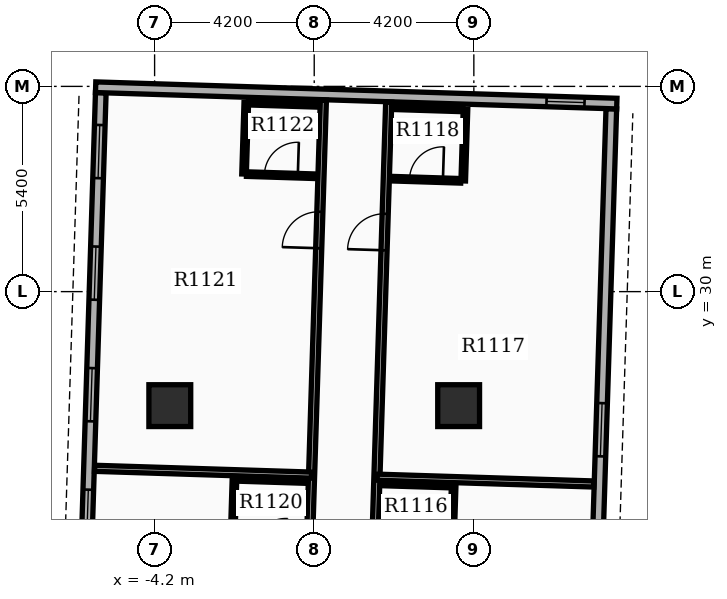
"""IFC4 building model, lengths in metres.
Left out: names, types, materials, properties, quantities, classifications, styles, units other than length and angle.
Written with IfcOpenShell. Run it as: python <this file> out.ifc"""

import sys

from ifc_helpers import new_model, si_unit, direction, frame, frame_2d, origin, origin_2d, place, context, subcontext, project, spatial, rectangle, extrude, element, fill, save


model = new_model("IFC4")
c1 = context("Model", 3, precision=1e-05, world=origin(), true_north=direction((0.0, 1.0)))
c2 = subcontext(c1, "Body", "Model", "MODEL_VIEW")
j1 = project(units=[si_unit("LENGTHUNIT", "METRE"), si_unit("PLANEANGLEUNIT", "RADIAN")], contexts=[c1])
p1 = place(None, origin())
s1 = spatial("IfcSite", under=j1, at=p1, CompositionType="ELEMENT")
p2 = place(p1, origin())
s2 = spatial("IfcBuilding", under=s1, at=p2, CompositionType="ELEMENT")
p3 = place(p2, frame((0.0, 0.0, 71.7)))
s3 = spatial("IfcBuildingStorey", under=s2, at=p3, CompositionType="ELEMENT", Elevation=71.7)
for number, where, z_axis, x_axis in (
    (1, (-3.8, 27.0, 0.0), (0.0, 0.0, 1.0), (1.0, 0.0, 0.0)),
    (2, (3.8, 27.0, 0.0), (0.0, 0.0, 1.0), (1.0, 0.0, 0.0)),
):
    element("IfcColumn", number, at=place(p3, frame(where, z_axis=z_axis, x_axis=x_axis)), inside=s3, PredefinedType="COLUMN", context=c2, shape_type="SweptSolid", body=[
        extrude(rectangle(XDim=1.1, YDim=1.1, at=origin_2d()), origin(), (0.0, 0.0, 1.0), 3.9),
    ])
p4 = place(p3, frame((7.186, 14.721, 0.0), z_axis=(0.0, 0.0, 1.0), x_axis=(0.031410322165, 0.999506574096, 0.0)))
e3 = element("IfcWall", 3, at=p4, inside=s3, PredefinedType="STANDARD", context=c2, shape_type="SweptSolid", body=[
    extrude(rectangle(XDim=20.1, YDim=0.28, at=frame_2d((10.05, 0.0))), origin(), (0.0, 0.0, 1.0), 2.91),
])
p5 = place(p4, frame((0.85, 0.0, 0.8)))
e4 = element("IfcOpeningElement", 4, at=p5, cuts=e3, PredefinedType="OPENING", context=c2, shape_type="SweptSolid", body=[
    extrude(rectangle(XDim=1.4, YDim=1.6, at=frame_2d((0.7, 0.8))), frame((0.0, 0.15, 0.0), z_axis=(0.0, -1.0, 0.0), x_axis=(1.0, 0.0, 0.0)), (0.0, 0.0, 1.0), 0.3),
])
p6 = place(p4, frame((4.05, 0.0, 0.8)))
e5 = element("IfcOpeningElement", 5, at=p6, cuts=e3, PredefinedType="OPENING", context=c2, shape_type="SweptSolid", body=[
    extrude(rectangle(XDim=1.4, YDim=1.6, at=frame_2d((0.7, 0.8))), frame((0.0, 0.15, 0.0), z_axis=(0.0, -1.0, 0.0), x_axis=(1.0, 0.0, 0.0)), (0.0, 0.0, 1.0), 0.3),
])
p7 = place(p4, frame((7.25, 0.0, 0.8)))
e6 = element("IfcOpeningElement", 6, at=p7, cuts=e3, PredefinedType="OPENING", context=c2, shape_type="SweptSolid", body=[
    extrude(rectangle(XDim=1.4, YDim=1.6, at=frame_2d((0.7, 0.8))), frame((0.0, 0.15, 0.0), z_axis=(0.0, -1.0, 0.0), x_axis=(1.0, 0.0, 0.0)), (0.0, 0.0, 1.0), 0.3),
])
p8 = place(p4, frame((10.95, 0.0, 0.8)))
e7 = element("IfcOpeningElement", 7, at=p8, cuts=e3, PredefinedType="OPENING", context=c2, shape_type="SweptSolid", body=[
    extrude(rectangle(XDim=1.4, YDim=1.6, at=frame_2d((0.7, 0.8))), frame((0.0, 0.15, 0.0), z_axis=(0.0, -1.0, 0.0), x_axis=(1.0, 0.0, 0.0)), (0.0, 0.0, 1.0), 0.3),
])
p9 = place(p3, frame((-5.616, 35.234, 0.0), z_axis=(0.0, 0.0, 1.0), x_axis=(-0.031398187845, -0.999506955354, 0.0)))
e8 = element("IfcWall", 8, at=p9, inside=s3, PredefinedType="STANDARD", context=c2, shape_type="SweptSolid", body=[
    extrude(rectangle(XDim=20.1, YDim=0.28, at=frame_2d((10.05, 0.0))), origin(), (0.0, 0.0, 1.0), 2.91),
])
p10 = place(p9, frame((0.85, 0.0, 0.8)))
e9 = element("IfcOpeningElement", 9, at=p10, cuts=e8, PredefinedType="OPENING", context=c2, shape_type="SweptSolid", body=[
    extrude(rectangle(XDim=1.4, YDim=1.6, at=frame_2d((0.7, 0.8))), frame((0.0, 0.15, 0.0), z_axis=(0.0, -1.0, 0.0), x_axis=(1.0, 0.0, 0.0)), (0.0, 0.0, 1.0), 0.3),
])
p11 = place(p9, frame((4.05, 0.0, 0.8)))
e10 = element("IfcOpeningElement", 10, at=p11, cuts=e8, PredefinedType="OPENING", context=c2, shape_type="SweptSolid", body=[
    extrude(rectangle(XDim=1.4, YDim=1.6, at=frame_2d((0.7, 0.8))), frame((0.0, 0.15, 0.0), z_axis=(0.0, -1.0, 0.0), x_axis=(1.0, 0.0, 0.0)), (0.0, 0.0, 1.0), 0.3),
])
p12 = place(p9, frame((7.25, 0.0, 0.8)))
e11 = element("IfcOpeningElement", 11, at=p12, cuts=e8, PredefinedType="OPENING", context=c2, shape_type="SweptSolid", body=[
    extrude(rectangle(XDim=1.4, YDim=1.6, at=frame_2d((0.7, 0.8))), frame((0.0, 0.15, 0.0), z_axis=(0.0, -1.0, 0.0), x_axis=(1.0, 0.0, 0.0)), (0.0, 0.0, 1.0), 0.3),
])
p13 = place(p9, frame((10.45, 0.0, 0.8)))
e12 = element("IfcOpeningElement", 12, at=p13, cuts=e8, PredefinedType="OPENING", context=c2, shape_type="SweptSolid", body=[
    extrude(rectangle(XDim=1.4, YDim=1.6, at=frame_2d((0.7, 0.8))), frame((0.0, 0.15, 0.0), z_axis=(0.0, -1.0, 0.0), x_axis=(1.0, 0.0, 0.0)), (0.0, 0.0, 1.0), 0.3),
])
p14 = place(p3, frame((7.962, 34.947, 0.0), z_axis=(0.0, 0.0, 1.0), x_axis=(-0.999506679556, 0.031406966164, 0.0)))
e13 = element("IfcWall", 13, at=p14, inside=s3, PredefinedType="STANDARD", context=c2, shape_type="SweptSolid", body=[
    extrude(rectangle(XDim=13.72, YDim=0.28, at=frame_2d((6.86, 0.0))), origin(), (0.0, 0.0, 1.0), 2.91),
])
p15 = place(p14, frame((0.85, 0.0, 0.85)))
e14 = element("IfcOpeningElement", 14, at=p15, cuts=e13, PredefinedType="OPENING", context=c2, shape_type="SweptSolid", body=[
    extrude(rectangle(XDim=1.0, YDim=1.5, at=frame_2d((0.5, 0.75))), frame((0.0, 0.15, 0.0), z_axis=(0.0, -1.0, 0.0), x_axis=(1.0, 0.0, 0.0)), (0.0, 0.0, 1.0), 0.3),
])
p16 = place(p3, frame((1.326, 14.816, 0.0), z_axis=(0.0, 0.0, 1.0), x_axis=(0.031415650687, 0.999506406629, 0.0)))
e15 = element("IfcWall", 15, at=p16, inside=s3, PredefinedType="PARTITIONING", context=c2, shape_type="SweptSolid", body=[
    extrude(rectangle(XDim=20.182, YDim=0.16, at=frame_2d((10.091, 0.0))), origin(), (0.0, 0.0, 1.0), 2.9),
])
p17 = place(p16, frame((1.106, 0.0, 0.0)))
e16 = element("IfcOpeningElement", 16, at=p17, cuts=e15, PredefinedType="OPENING", context=c2, shape_type="SweptSolid", body=[
    extrude(rectangle(XDim=0.96, YDim=2.15, at=frame_2d((0.48, 1.075))), frame((0.0, 0.09, 0.0), z_axis=(0.0, -1.0, 0.0), x_axis=(1.0, 0.0, 0.0)), (0.0, 0.0, 1.0), 0.18),
])
p18 = place(p16, frame((16.28, 0.0, 0.0)))
e17 = element("IfcOpeningElement", 17, at=p18, cuts=e15, PredefinedType="OPENING", context=c2, shape_type="SweptSolid", body=[
    extrude(rectangle(XDim=0.96, YDim=2.15, at=frame_2d((0.48, 1.075))), frame((0.0, 0.09, 0.0), z_axis=(0.0, -1.0, 0.0), x_axis=(1.0, 0.0, 0.0)), (0.0, 0.0, 1.0), 0.18),
])
p19 = place(p3, frame((1.65, 25.118, 0.0), z_axis=(0.0, 0.0, 1.0), x_axis=(0.999505045245, -0.031458934028, 0.0)))
e18 = element("IfcWall", 18, at=p19, inside=s3, PredefinedType="PARTITIONING", context=c2, shape_type="SweptSolid", body=[
    extrude(rectangle(XDim=5.712, YDim=0.16, at=frame_2d((2.856, 0.0))), origin(), (0.0, 0.0, 1.0), 2.9),
])
p20 = place(p3, frame((1.785, 24.953, 0.0), z_axis=(0.0, 0.0, 1.0), x_axis=(0.999503004171, -0.03152371574, 0.0)))
e19 = element("IfcWall", 19, at=p20, inside=s3, PredefinedType="PARTITIONING", context=c2, shape_type="SweptSolid", body=[
    extrude(rectangle(XDim=1.82, YDim=0.12, at=frame_2d((0.91, 0.0))), origin(), (0.0, 0.0, 1.0), 2.9),
])
p21 = place(p3, frame((3.61, 23.015, 0.0), z_axis=(0.0, 0.0, 1.0), x_axis=(0.031425292588, 0.999506103526, 0.0)))
e20 = element("IfcWall", 20, at=p21, inside=s3, PredefinedType="PARTITIONING", context=c2, shape_type="SweptSolid", body=[
    extrude(rectangle(XDim=1.88, YDim=0.12, at=frame_2d((0.94, 0.0))), origin(), (0.0, 0.0, 1.0), 2.9),
])
p22 = place(p3, frame((2.037, 32.972, 0.0), z_axis=(0.0, 0.0, 1.0), x_axis=(0.999503004171, -0.03152371574, 0.0)))
e21 = element("IfcWall", 21, at=p22, inside=s3, PredefinedType="PARTITIONING", context=c2, shape_type="SweptSolid", body=[
    extrude(rectangle(XDim=1.82, YDim=0.12, at=frame_2d((0.91, 0.0))), origin(), (0.0, 0.0, 1.0), 2.9),
])
p23 = place(p22, frame((0.47, 0.0, 0.0)))
e22 = element("IfcOpeningElement", 22, at=p23, cuts=e21, PredefinedType="OPENING", context=c2, shape_type="SweptSolid", body=[
    extrude(rectangle(XDim=0.88, YDim=2.1, at=frame_2d((0.44, 1.05))), frame((0.0, 0.07, 0.0), z_axis=(0.0, -1.0, 0.0), x_axis=(1.0, 0.0, 0.0)), (0.0, 0.0, 1.0), 0.14),
])
p24 = place(p3, frame((2.096, 34.851, 0.0), z_axis=(0.0, 0.0, 1.0), x_axis=(0.999507221803, -0.031389704724, 0.0)))
e23 = element("IfcWall", 23, at=p24, inside=s3, PredefinedType="PARTITIONING", context=c2, shape_type="SweptSolid", body=[
    extrude(rectangle(XDim=1.82, YDim=0.12, at=frame_2d((0.91, 0.0))), origin(), (0.0, 0.0, 1.0), 2.9),
])
p25 = place(p3, frame((3.921, 32.913, 0.0), z_axis=(0.0, 0.0, 1.0), x_axis=(0.031295563454, 0.999510173889, 0.0)))
e24 = element("IfcWall", 24, at=p25, inside=s3, PredefinedType="PARTITIONING", context=c2, shape_type="SweptSolid", body=[
    extrude(rectangle(XDim=1.88, YDim=0.12, at=frame_2d((0.94, 0.0))), origin(), (0.0, 0.0, 1.0), 2.9),
])
p26 = place(p3, frame((-0.393, 14.87, 0.0), z_axis=(0.0, 0.0, 1.0), x_axis=(0.031403565719, 0.9995067864, 0.0)))
e25 = element("IfcWall", 25, at=p26, inside=s3, PredefinedType="PARTITIONING", context=c2, shape_type="SweptSolid", body=[
    extrude(rectangle(XDim=20.182, YDim=0.16, at=frame_2d((10.091, 0.0))), origin(), (0.0, 0.0, 1.0), 2.9),
])
p27 = place(p26, frame((1.106, 0.0, 0.0)))
e26 = element("IfcOpeningElement", 26, at=p27, cuts=e25, PredefinedType="OPENING", context=c2, shape_type="SweptSolid", body=[
    extrude(rectangle(XDim=0.96, YDim=2.15, at=frame_2d((0.48, 1.075))), frame((0.0, 0.09, 0.0), z_axis=(0.0, -1.0, 0.0), x_axis=(1.0, 0.0, 0.0)), (0.0, 0.0, 1.0), 0.18),
])
p28 = place(p26, frame((16.28, 0.0, 0.0)))
e27 = element("IfcOpeningElement", 27, at=p28, cuts=e25, PredefinedType="OPENING", context=c2, shape_type="SweptSolid", body=[
    extrude(rectangle(XDim=0.96, YDim=2.15, at=frame_2d((0.48, 1.075))), frame((0.0, 0.09, 0.0), z_axis=(0.0, -1.0, 0.0), x_axis=(1.0, 0.0, 0.0)), (0.0, 0.0, 1.0), 0.18),
])
p29 = place(p3, frame((-0.069, 25.172, 0.0), z_axis=(0.0, 0.0, 1.0), x_axis=(-0.999506430506, 0.031414891017, 0.0)))
e28 = element("IfcWall", 28, at=p29, inside=s3, PredefinedType="PARTITIONING", context=c2, shape_type="SweptSolid", body=[
    extrude(rectangle(XDim=5.712, YDim=0.16, at=frame_2d((2.856, 0.0))), origin(), (0.0, 0.0, 1.0), 2.9),
])
p30 = place(p3, frame((-2.033, 25.073, 0.0), z_axis=(0.0, 0.0, 1.0), x_axis=(0.999507221803, -0.031389704724, 0.0)))
e29 = element("IfcWall", 29, at=p30, inside=s3, PredefinedType="PARTITIONING", context=c2, shape_type="SweptSolid", body=[
    extrude(rectangle(XDim=1.82, YDim=0.12, at=frame_2d((0.91, 0.0))), origin(), (0.0, 0.0, 1.0), 2.9),
])
p31 = place(p3, frame((-2.157, 23.196, 0.0), z_axis=(0.0, 0.0, 1.0), x_axis=(0.031429371883, 0.999505975261, 0.0)))
e30 = element("IfcWall", 30, at=p31, inside=s3, PredefinedType="PARTITIONING", context=c2, shape_type="SweptSolid", body=[
    extrude(rectangle(XDim=1.88, YDim=0.12, at=frame_2d((0.94, 0.0))), origin(), (0.0, 0.0, 1.0), 2.9),
])
p32 = place(p3, frame((-1.781, 33.092, 0.0), z_axis=(0.0, 0.0, 1.0), x_axis=(0.999507221803, -0.031389704724, 0.0)))
e31 = element("IfcWall", 31, at=p32, inside=s3, PredefinedType="PARTITIONING", context=c2, shape_type="SweptSolid", body=[
    extrude(rectangle(XDim=1.82, YDim=0.12, at=frame_2d((0.91, 0.0))), origin(), (0.0, 0.0, 1.0), 2.9),
])
p33 = place(p32, frame((0.47, 0.0, 0.0)))
e32 = element("IfcOpeningElement", 32, at=p33, cuts=e31, PredefinedType="OPENING", context=c2, shape_type="SweptSolid", body=[
    extrude(rectangle(XDim=0.88, YDim=2.1, at=frame_2d((0.44, 1.05))), frame((0.0, 0.07, 0.0), z_axis=(0.0, -1.0, 0.0), x_axis=(1.0, 0.0, 0.0)), (0.0, 0.0, 1.0), 0.14),
])
p34 = place(p3, frame((-1.722, 34.971, 0.0), z_axis=(0.0, 0.0, 1.0), x_axis=(0.999507221803, -0.031389704724, 0.0)))
e33 = element("IfcWall", 33, at=p34, inside=s3, PredefinedType="PARTITIONING", context=c2, shape_type="SweptSolid", body=[
    extrude(rectangle(XDim=1.82, YDim=0.12, at=frame_2d((0.91, 0.0))), origin(), (0.0, 0.0, 1.0), 2.9),
])
p35 = place(p3, frame((-1.846, 33.094, 0.0), z_axis=(0.0, 0.0, 1.0), x_axis=(0.031425292588, 0.999506103526, 0.0)))
e34 = element("IfcWall", 34, at=p35, inside=s3, PredefinedType="PARTITIONING", context=c2, shape_type="SweptSolid", body=[
    extrude(rectangle(XDim=1.88, YDim=0.12, at=frame_2d((0.94, 0.0))), origin(), (0.0, 0.0, 1.0), 2.9),
])
p36 = place(p8, origin())
e35 = element("IfcWindow", 35, at=p36, inside=s3, PartitioningType="SINGLE_PANEL", PredefinedType="WINDOW", context=c2, shape_type="SweptSolid", body=[
    extrude(rectangle(XDim=1.4, YDim=1.6, at=frame_2d((0.7, 0.8))), frame((0.0, 0.03, 0.0), z_axis=(0.0, -1.0, 0.0), x_axis=(1.0, 0.0, 0.0)), (0.0, 0.0, 1.0), 0.06),
])
fill(e7, e35)
p37 = place(p10, origin())
e36 = element("IfcWindow", 36, at=p37, inside=s3, PartitioningType="SINGLE_PANEL", PredefinedType="WINDOW", context=c2, shape_type="SweptSolid", body=[
    extrude(rectangle(XDim=1.4, YDim=1.6, at=frame_2d((0.7, 0.8))), frame((0.0, 0.03, 0.0), z_axis=(0.0, -1.0, 0.0), x_axis=(1.0, 0.0, 0.0)), (0.0, 0.0, 1.0), 0.06),
])
fill(e9, e36)
p38 = place(p11, origin())
e37 = element("IfcWindow", 37, at=p38, inside=s3, PartitioningType="SINGLE_PANEL", PredefinedType="WINDOW", context=c2, shape_type="SweptSolid", body=[
    extrude(rectangle(XDim=1.4, YDim=1.6, at=frame_2d((0.7, 0.8))), frame((0.0, 0.03, 0.0), z_axis=(0.0, -1.0, 0.0), x_axis=(1.0, 0.0, 0.0)), (0.0, 0.0, 1.0), 0.06),
])
fill(e10, e37)
p39 = place(p12, origin())
e38 = element("IfcWindow", 38, at=p39, inside=s3, PartitioningType="SINGLE_PANEL", PredefinedType="WINDOW", context=c2, shape_type="SweptSolid", body=[
    extrude(rectangle(XDim=1.4, YDim=1.6, at=frame_2d((0.7, 0.8))), frame((0.0, 0.03, 0.0), z_axis=(0.0, -1.0, 0.0), x_axis=(1.0, 0.0, 0.0)), (0.0, 0.0, 1.0), 0.06),
])
fill(e11, e38)
p40 = place(p13, origin())
e39 = element("IfcWindow", 39, at=p40, inside=s3, PartitioningType="SINGLE_PANEL", PredefinedType="WINDOW", context=c2, shape_type="SweptSolid", body=[
    extrude(rectangle(XDim=1.4, YDim=1.6, at=frame_2d((0.7, 0.8))), frame((0.0, 0.03, 0.0), z_axis=(0.0, -1.0, 0.0), x_axis=(1.0, 0.0, 0.0)), (0.0, 0.0, 1.0), 0.06),
])
fill(e12, e39)
p41 = place(p15, origin())
e40 = element("IfcWindow", 40, at=p41, inside=s3, PartitioningType="SINGLE_PANEL", PredefinedType="WINDOW", context=c2, shape_type="SweptSolid", body=[
    extrude(rectangle(XDim=1.0, YDim=1.5, at=frame_2d((0.5, 0.75))), frame((0.0, 0.03, 0.0), z_axis=(0.0, -1.0, 0.0), x_axis=(1.0, 0.0, 0.0)), (0.0, 0.0, 1.0), 0.06),
])
fill(e14, e40)
p42 = place(p18, origin())
e41 = element("IfcDoor", 41, at=p42, inside=s3, OperationType="SINGLE_SWING_LEFT", PredefinedType="DOOR", context=c2, shape_type="SweptSolid", body=[
    extrude(rectangle(XDim=0.96, YDim=2.15, at=frame_2d((0.48, 1.075))), frame((0.0, 0.025, 0.0), z_axis=(0.0, -1.0, 0.0), x_axis=(1.0, 0.0, 0.0)), (0.0, 0.0, 1.0), 0.05),
])
fill(e17, e41)
p43 = place(p23, origin())
e42 = element("IfcDoor", 42, at=p43, inside=s3, OperationType="SINGLE_SWING_RIGHT", PredefinedType="DOOR", context=c2, shape_type="SweptSolid", body=[
    extrude(rectangle(XDim=0.88, YDim=2.1, at=frame_2d((0.44, 1.05))), frame((0.0, 0.025, 0.0), z_axis=(0.0, -1.0, 0.0), x_axis=(1.0, 0.0, 0.0)), (0.0, 0.0, 1.0), 0.05),
])
fill(e22, e42)
p44 = place(p28, origin())
e43 = element("IfcDoor", 43, at=p44, inside=s3, OperationType="SINGLE_SWING_LEFT", PredefinedType="DOOR", context=c2, shape_type="SweptSolid", body=[
    extrude(rectangle(XDim=0.96, YDim=2.15, at=frame_2d((0.48, 1.075))), frame((0.0, 0.025, 0.0), z_axis=(0.0, -1.0, 0.0), x_axis=(1.0, 0.0, 0.0)), (0.0, 0.0, 1.0), 0.05),
])
fill(e27, e43)
p45 = place(p33, origin())
e44 = element("IfcDoor", 44, at=p45, inside=s3, OperationType="SINGLE_SWING_RIGHT", PredefinedType="DOOR", context=c2, shape_type="SweptSolid", body=[
    extrude(rectangle(XDim=0.88, YDim=2.1, at=frame_2d((0.44, 1.05))), frame((0.0, 0.025, 0.0), z_axis=(0.0, -1.0, 0.0), x_axis=(1.0, 0.0, 0.0)), (0.0, 0.0, 1.0), 0.05),
])
fill(e32, e44)
save(model, sys.argv[1])
